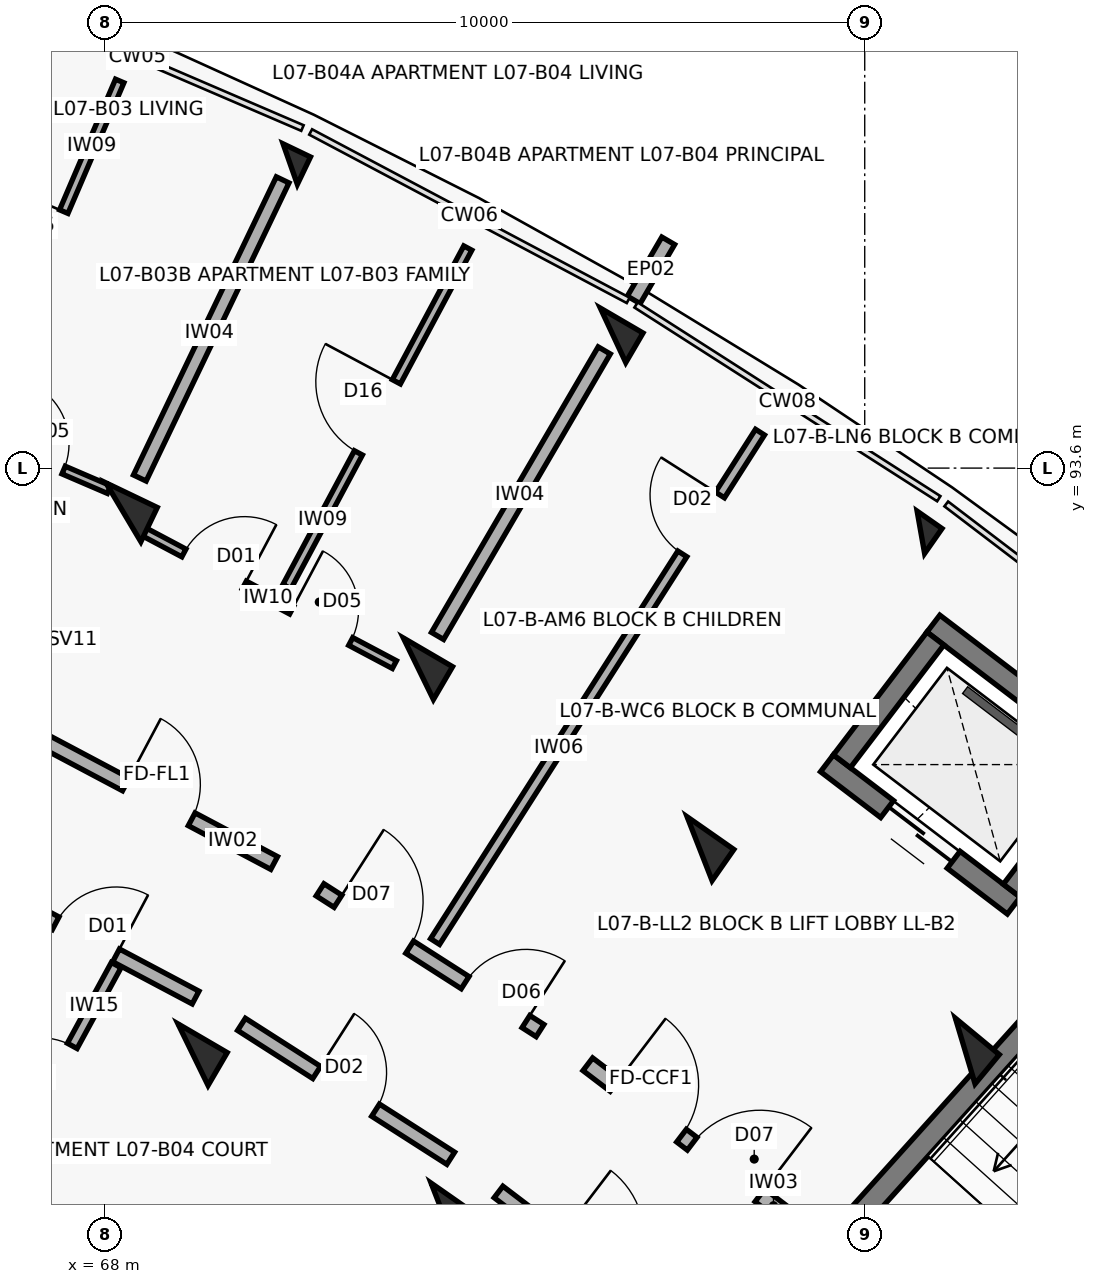
"""IFC4 building model, lengths in metres.
Left out: names, types, materials, properties, quantities, classifications, styles, units other than length and angle.
Written with IfcOpenShell. Run it as: python <this file> out.ifc"""

import sys

from ifc_helpers import new_model, si_unit, direction, frame, frame_2d, origin, origin_2d, place, context, subcontext, project, spatial, rectangle, extrude, element, fill, save


model = new_model("IFC4")
c1 = context("Model", 3, precision=1e-05, world=origin(), true_north=direction((0.0, 1.0)))
c2 = subcontext(c1, "Body", "Model", "MODEL_VIEW")
j1 = project(units=[si_unit("LENGTHUNIT", "METRE"), si_unit("PLANEANGLEUNIT", "RADIAN")], contexts=[c1])
p1 = place(None, origin())
s1 = spatial("IfcSite", under=j1, at=p1, CompositionType="ELEMENT")
p2 = place(p1, origin())
s2 = spatial("IfcBuilding", under=s1, at=p2, CompositionType="ELEMENT")
p3 = place(p2, frame((0.0, 0.0, 23.6)))
s3 = spatial("IfcBuildingStorey", under=s2, at=p3, CompositionType="ELEMENT", Elevation=23.6)
p4 = place(p3, frame((68.246, 93.019, 0.0), z_axis=(0.0, 0.0, 1.0), x_axis=(0.432085748802, 0.901832526405, 0.0)))
e1 = element("IfcColumn", 1, at=p4, inside=s3, PredefinedType="COLUMN", context=c2, shape_type="SweptSolid", body=[
    extrude(rectangle(XDim=0.5, YDim=0.75, at=origin_2d()), origin(), (0.0, 0.0, 1.0), 3.1),
])
p5 = place(p3, frame((70.441, 97.6, 0.0), z_axis=(0.0, 0.0, 1.0), x_axis=(0.432085748802, 0.901832526405, 0.0)))
e2 = element("IfcColumn", 2, at=p5, inside=s3, PredefinedType="COLUMN", context=c2, shape_type="SweptSolid", body=[
    extrude(rectangle(XDim=0.4, YDim=0.4, at=origin_2d()), origin(), (0.0, 0.0, 1.0), 3.1),
])
for number, where, z_axis, x_axis in (
    (3, (69.163, 85.882, 0.0), (0.0, 0.0, 1.0), (0.504, 0.864, 0.0)),
    (4, (72.127, 90.96, 0.0), (0.0, 0.0, 1.0), (0.504, 0.864, 0.0)),
):
    element("IfcColumn", number, at=place(p3, frame(where, z_axis=z_axis, x_axis=x_axis)), inside=s3, PredefinedType="COLUMN", context=c2, shape_type="SweptSolid", body=[
        extrude(rectangle(XDim=0.5, YDim=0.75, at=origin_2d()), origin(), (0.0, 0.0, 1.0), 3.1),
    ])
p6 = place(p3, frame((74.689, 95.347, 0.0), z_axis=(0.0, 0.0, 1.0), x_axis=(0.504226211181, 0.863571611366, 0.0)))
e5 = element("IfcColumn", 5, at=p6, inside=s3, PredefinedType="COLUMN", context=c2, shape_type="SweptSolid", body=[
    extrude(rectangle(XDim=0.45, YDim=0.65, at=origin_2d()), origin(), (0.0, 0.0, 1.0), 3.1),
])
for number, where, z_axis, x_axis in (
    (6, (72.458, 83.773, 0.0), (0.0, 0.0, 1.0), (0.573, 0.82, 0.0)),
    (7, (75.828, 88.592, 0.0), (0.0, 0.0, 1.0), (0.573, 0.82, 0.0)),
):
    element("IfcColumn", number, at=place(p3, frame(where, z_axis=z_axis, x_axis=x_axis)), inside=s3, PredefinedType="COLUMN", context=c2, shape_type="SweptSolid", body=[
        extrude(rectangle(XDim=0.5, YDim=0.75, at=origin_2d()), origin(), (0.0, 0.0, 1.0), 3.1),
    ])
p7 = place(p3, frame((78.739, 92.755, 0.0), z_axis=(0.0, 0.0, 1.0), x_axis=(0.573004420611, 0.819552276527, 0.0)))
e8 = element("IfcColumn", 8, at=p7, inside=s3, PredefinedType="COLUMN", context=c2, shape_type="SweptSolid", body=[
    extrude(rectangle(XDim=0.4, YDim=0.4, at=origin_2d()), origin(), (0.0, 0.0, 1.0), 3.1),
])
p8 = place(p3, frame((79.322, 85.93, 0.0), z_axis=(0.0, 0.0, 1.0), x_axis=(0.637961754089, 0.770068049148, 0.0)))
e9 = element("IfcColumn", 9, at=p8, inside=s3, PredefinedType="COLUMN", context=c2, shape_type="SweptSolid", body=[
    extrude(rectangle(XDim=0.5, YDim=0.75, at=origin_2d()), origin(), (0.0, 0.0, 1.0), 3.1),
])
p9 = place(p3, frame((74.961, 95.813, 0.0), z_axis=(0.0, 0.0, 1.0), x_axis=(0.504326383773, 0.863513114336, 0.0)))
e10 = element("IfcWall", 10, at=p9, inside=s3, PredefinedType="PARAPET", context=c2, shape_type="SweptSolid", body=[
    extrude(rectangle(XDim=0.9, YDim=0.195, at=frame_2d((0.45, 0.0))), origin(), (0.0, 0.0, 1.0), 2.25),
])
p10 = place(p3, frame((77.655, 83.461, 0.0), z_axis=(0.0, 0.0, 1.0), x_axis=(0.668868253964, 0.743380964808, 0.0)))
e11 = element("IfcWall", 11, at=p10, inside=s3, PredefinedType="SHEAR", context=c2, shape_type="SweptSolid", body=[
    extrude(rectangle(XDim=7.69, YDim=0.3, at=frame_2d((3.845, 0.0))), origin(), (0.0, 0.0, 1.0), 3.1),
])
p11 = place(p3, frame((79.961, 87.844, 0.0), z_axis=(0.0, 0.0, 1.0), x_axis=(-0.795464365424, 0.606000365793, 0.0)))
e12 = element("IfcWall", 12, at=p11, inside=s3, PredefinedType="SHEAR", context=c2, shape_type="SweptSolid", body=[
    extrude(rectangle(XDim=3.09, YDim=0.28, at=frame_2d((1.545, 0.0))), origin(), (0.0, 0.0, 1.0), 3.1),
])
p12 = place(p11, frame((0.995, 0.0, 0.0)))
e13 = element("IfcOpeningElement", 13, at=p12, cuts=e12, PredefinedType="OPENING", context=c2, shape_type="SweptSolid", body=[
    extrude(rectangle(XDim=1.1, YDim=2.15, at=frame_2d((0.55, 1.075))), frame((0.0, 0.15, 0.0), z_axis=(0.0, -1.0, 0.0), x_axis=(1.0, 0.0, 0.0)), (0.0, 0.0, 1.0), 0.3),
])
p13 = place(p3, frame((81.361, 89.681, 0.0), z_axis=(0.0, 0.0, 1.0), x_axis=(-0.795502452183, 0.605950368076, 0.0)))
e14 = element("IfcWall", 14, at=p13, inside=s3, PredefinedType="SHEAR", context=c2, shape_type="SweptSolid", body=[
    extrude(rectangle(XDim=3.09, YDim=0.28, at=frame_2d((1.545, 0.0))), origin(), (0.0, 0.0, 1.0), 3.1),
])
for number, where, z_axis, x_axis in (
    (15, (79.935, 88.04, 0.0), (0.0, 0.0, 1.0), (0.606, 0.795, 0.0)),
    (16, (77.699, 89.743, 0.0), (0.0, 0.0, 1.0), (0.606, 0.795, 0.0)),
):
    element("IfcWall", number, at=place(p3, frame(where, z_axis=z_axis, x_axis=x_axis)), inside=s3, PredefinedType="SHEAR", context=c2, shape_type="SweptSolid", body=[
        extrude(rectangle(XDim=2.03, YDim=0.28, at=frame_2d((1.015, 0.0))), origin(), (0.0, 0.0, 1.0), 3.1),
    ])
p14 = place(p3, frame((64.557, 94.822, 0.0), z_axis=(0.0, 0.0, 1.0), x_axis=(0.918726854017, -0.394893615684, 0.0)))
e17 = element("IfcWall", 17, at=p14, inside=s3, PredefinedType="PARTITIONING", context=c2, shape_type="SweptSolid", body=[
    extrude(rectangle(XDim=3.81, YDim=0.11, at=frame_2d((1.905, 0.0))), origin(), (0.0, 0.0, 1.0), 2.08),
])
p15 = place(p14, frame((0.65, 0.0, 0.0)))
e18 = element("IfcOpeningElement", 18, at=p15, cuts=e17, PredefinedType="OPENING", context=c2, shape_type="SweptSolid", body=[
    extrude(rectangle(XDim=0.9, YDim=2.1, at=frame_2d((0.45, 1.05))), frame((0.0, 0.065, 0.0), z_axis=(0.0, -1.0, 0.0), x_axis=(1.0, 0.0, 0.0)), (0.0, 0.0, 1.0), 0.13),
])
p16 = place(p14, frame((2.28, 0.0, 0.0)))
e19 = element("IfcOpeningElement", 19, at=p16, cuts=e17, PredefinedType="OPENING", context=c2, shape_type="SweptSolid", body=[
    extrude(rectangle(XDim=0.88, YDim=2.1, at=frame_2d((0.44, 1.05))), frame((0.0, 0.065, 0.0), z_axis=(0.0, -1.0, 0.0), x_axis=(1.0, 0.0, 0.0)), (0.0, 0.0, 1.0), 0.13),
])
p17 = place(p3, frame((66.329, 94.327, 0.0), z_axis=(0.0, 0.0, 1.0), x_axis=(0.393553279267, 0.919301809189, 0.0)))
e20 = element("IfcWall", 20, at=p17, inside=s3, PredefinedType="PARTITIONING", context=c2, shape_type="SweptSolid", body=[
    extrude(rectangle(XDim=4.75, YDim=0.12, at=frame_2d((2.375, 0.0))), origin(), (0.0, 0.0, 1.0), 2.08),
])
p18 = place(p17, frame((1.87, 0.0, 0.0)))
e21 = element("IfcOpeningElement", 21, at=p18, cuts=e20, PredefinedType="OPENING", context=c2, shape_type="SweptSolid", body=[
    extrude(rectangle(XDim=1.01, YDim=2.1, at=frame_2d((0.505, 1.05))), frame((0.0, 0.07, 0.0), z_axis=(0.0, -1.0, 0.0), x_axis=(1.0, 0.0, 0.0)), (0.0, 0.0, 1.0), 0.14),
])
p19 = place(p3, frame((67.194, 90.014, 0.0), z_axis=(0.0, 0.0, 1.0), x_axis=(0.883410853063, -0.468599258099, 0.0)))
e22 = element("IfcWall", 22, at=p19, inside=s3, PredefinedType="SOLIDWALL", context=c2, shape_type="SweptSolid", body=[
    extrude(rectangle(XDim=3.436, YDim=0.19, at=frame_2d((1.718, 0.0))), origin(), (0.0, 0.0, 1.0), 2.08),
])
p20 = place(p19, frame((1.228, 0.0, 0.0)))
e23 = element("IfcOpeningElement", 23, at=p20, cuts=e22, PredefinedType="OPENING", context=c2, shape_type="SweptSolid", body=[
    extrude(rectangle(XDim=0.98, YDim=2.15, at=frame_2d((0.49, 1.075))), frame((0.0, 0.105, 0.0), z_axis=(0.0, -1.0, 0.0), x_axis=(1.0, 0.0, 0.0)), (0.0, 0.0, 1.0), 0.21),
])
p21 = place(p3, frame((66.309, 88.165, 0.0), z_axis=(0.0, 0.0, 1.0), x_axis=(0.883444301944, -0.468536194293, 0.0)))
e24 = element("IfcWall", 24, at=p21, inside=s3, PredefinedType="SOLIDWALL", context=c2, shape_type="SweptSolid", body=[
    extrude(rectangle(XDim=3.269, YDim=0.19, at=frame_2d((1.634, 0.0))), origin(), (0.0, 0.0, 1.0), 2.08),
])
p22 = place(p21, frame((1.184, 0.0, 0.0)))
e25 = element("IfcOpeningElement", 25, at=p22, cuts=e24, PredefinedType="OPENING", context=c2, shape_type="SweptSolid", body=[
    extrude(rectangle(XDim=0.9, YDim=2.1, at=frame_2d((0.45, 1.05))), frame((0.0, 0.105, 0.0), z_axis=(0.0, -1.0, 0.0), x_axis=(1.0, 0.0, 0.0)), (0.0, 0.0, 1.0), 0.21),
])
p23 = place(p3, frame((66.575, 84.162, 0.0), z_axis=(0.0, 0.0, 1.0), x_axis=(0.477841058477, 0.878446311868, 0.0)))
e26 = element("IfcWall", 26, at=p23, inside=s3, PredefinedType="PARTITIONING", context=c2, shape_type="SweptSolid", body=[
    extrude(rectangle(XDim=3.3, YDim=0.145, at=frame_2d((1.65, 0.0))), origin(), (0.0, 0.0, 1.0), 2.08),
])
p24 = place(p23, frame((1.21, 0.0, 0.0)))
e27 = element("IfcOpeningElement", 27, at=p24, cuts=e26, PredefinedType="OPENING", context=c2, shape_type="SweptSolid", body=[
    extrude(rectangle(XDim=0.88, YDim=2.1, at=frame_2d((0.44, 1.05))), frame((0.0, 0.083, 0.0), z_axis=(0.0, -1.0, 0.0), x_axis=(1.0, 0.0, 0.0)), (0.0, 0.0, 1.0), 0.165),
])
p25 = place(p3, frame((68.468, 92.788, 0.0), z_axis=(0.0, 0.0, 1.0), x_axis=(0.883450371448, -0.468524749814, 0.0)))
e28 = element("IfcWall", 28, at=p25, inside=s3, PredefinedType="PARTITIONING", context=c2, shape_type="SweptSolid", body=[
    extrude(rectangle(XDim=3.785, YDim=0.115, at=frame_2d((1.893, 0.0))), origin(), (0.0, 0.0, 1.0), 2.08),
])
p26 = place(p25, frame((0.65, 0.0, 0.0)))
e29 = element("IfcOpeningElement", 29, at=p26, cuts=e28, PredefinedType="OPENING", context=c2, shape_type="SweptSolid", body=[
    extrude(rectangle(XDim=0.9, YDim=2.1, at=frame_2d((0.45, 1.05))), frame((0.0, 0.067, 0.0), z_axis=(0.0, -1.0, 0.0), x_axis=(1.0, 0.0, 0.0)), (0.0, 0.0, 1.0), 0.135),
])
p27 = place(p25, frame((2.255, 0.0, 0.0)))
e30 = element("IfcOpeningElement", 30, at=p27, cuts=e28, PredefinedType="OPENING", context=c2, shape_type="SweptSolid", body=[
    extrude(rectangle(XDim=0.88, YDim=2.1, at=frame_2d((0.44, 1.05))), frame((0.0, 0.067, 0.0), z_axis=(0.0, -1.0, 0.0), x_axis=(1.0, 0.0, 0.0)), (0.0, 0.0, 1.0), 0.135),
])
p28 = place(p3, frame((70.398, 92.041, 0.0), z_axis=(0.0, 0.0, 1.0), x_axis=(0.471222960991, 0.882014127457, 0.0)))
e31 = element("IfcWall", 31, at=p28, inside=s3, PredefinedType="PARTITIONING", context=c2, shape_type="SweptSolid", body=[
    extrude(rectangle(XDim=5.05, YDim=0.12, at=frame_2d((2.525, 0.0))), origin(), (0.0, 0.0, 1.0), 2.08),
])
p29 = place(p28, frame((1.995, 0.0, 0.0)))
e32 = element("IfcOpeningElement", 32, at=p29, cuts=e31, PredefinedType="OPENING", context=c2, shape_type="SweptSolid", body=[
    extrude(rectangle(XDim=1.06, YDim=2.1, at=frame_2d((0.53, 1.05))), frame((0.0, 0.07, 0.0), z_axis=(0.0, -1.0, 0.0), x_axis=(1.0, 0.0, 0.0)), (0.0, 0.0, 1.0), 0.14),
])
p30 = place(p3, frame((68.462, 93.469, 0.0), z_axis=(0.0, 0.0, 1.0), x_axis=(0.432086898897, 0.901831975371, 0.0)))
e33 = element("IfcWall", 33, at=p30, inside=s3, PredefinedType="SOLIDWALL", context=c2, shape_type="SweptSolid", body=[
    extrude(rectangle(XDim=4.35, YDim=0.185, at=frame_2d((2.175, 0.0))), origin(), (0.0, 0.0, 1.0), 2.08),
])
p31 = place(p3, frame((70.834, 88.051, 0.0), z_axis=(0.0, 0.0, 1.0), x_axis=(0.842257205985, -0.539075874963, 0.0)))
e34 = element("IfcWall", 34, at=p31, inside=s3, PredefinedType="SOLIDWALL", context=c2, shape_type="SweptSolid", body=[
    extrude(rectangle(XDim=3.436, YDim=0.19, at=frame_2d((1.718, 0.0))), origin(), (0.0, 0.0, 1.0), 2.08),
])
p32 = place(p31, frame((0.28, 0.0, 0.0)))
e35 = element("IfcOpeningElement", 35, at=p32, cuts=e34, PredefinedType="OPENING", context=c2, shape_type="SweptSolid", body=[
    extrude(rectangle(XDim=1.12, YDim=2.15, at=frame_2d((0.56, 1.075))), frame((0.0, 0.105, 0.0), z_axis=(0.0, -1.0, 0.0), x_axis=(1.0, 0.0, 0.0)), (0.0, 0.0, 1.0), 0.21),
])
p33 = place(p31, frame((2.266, 0.0, 0.0)))
e36 = element("IfcOpeningElement", 36, at=p33, cuts=e34, PredefinedType="OPENING", context=c2, shape_type="SweptSolid", body=[
    extrude(rectangle(XDim=0.95, YDim=2.1, at=frame_2d((0.475, 1.05))), frame((0.0, 0.105, 0.0), z_axis=(0.0, -1.0, 0.0), x_axis=(1.0, 0.0, 0.0)), (0.0, 0.0, 1.0), 0.21),
])
p34 = place(p3, frame((69.8, 86.281, 0.0), z_axis=(0.0, 0.0, 1.0), x_axis=(0.842225276846, -0.539125758095, 0.0)))
e37 = element("IfcWall", 37, at=p34, inside=s3, PredefinedType="SOLIDWALL", context=c2, shape_type="SweptSolid", body=[
    extrude(rectangle(XDim=3.269, YDim=0.19, at=frame_2d((1.634, 0.0))), origin(), (0.0, 0.0, 1.0), 2.08),
])
p35 = place(p34, frame((1.174, 0.0, 0.0)))
e38 = element("IfcOpeningElement", 38, at=p35, cuts=e37, PredefinedType="OPENING", context=c2, shape_type="SweptSolid", body=[
    extrude(rectangle(XDim=0.92, YDim=2.1, at=frame_2d((0.46, 1.05))), frame((0.0, 0.105, 0.0), z_axis=(0.0, -1.0, 0.0), x_axis=(1.0, 0.0, 0.0)), (0.0, 0.0, 1.0), 0.21),
])
p36 = place(p3, frame((72.347, 87.37, 0.0), z_axis=(0.0, 0.0, 1.0), x_axis=(0.537777309481, 0.843086926365, 0.0)))
e39 = element("IfcWall", 39, at=p36, inside=s3, PredefinedType="PARTITIONING", context=c2, shape_type="SweptSolid", body=[
    extrude(rectangle(XDim=7.95, YDim=0.14, at=frame_2d((3.975, 0.0))), origin(), (0.0, 0.0, 1.0), 2.08),
])
p37 = place(p36, frame((6.05, 0.0, 0.0)))
e40 = element("IfcOpeningElement", 40, at=p37, cuts=e39, PredefinedType="OPENING", context=c2, shape_type="SweptSolid", body=[
    extrude(rectangle(XDim=0.92, YDim=2.1, at=frame_2d((0.46, 1.05))), frame((0.0, 0.08, 0.0), z_axis=(0.0, -1.0, 0.0), x_axis=(1.0, 0.0, 0.0)), (0.0, 0.0, 1.0), 0.16),
])
p38 = place(p3, frame((72.379, 91.392, 0.0), z_axis=(0.0, 0.0, 1.0), x_axis=(0.504216452091, 0.863577309475, 0.0)))
e41 = element("IfcWall", 41, at=p38, inside=s3, PredefinedType="SOLIDWALL", context=c2, shape_type="SweptSolid", body=[
    extrude(rectangle(XDim=4.35, YDim=0.185, at=frame_2d((2.175, 0.0))), origin(), (0.0, 0.0, 1.0), 2.08),
])
p39 = place(p3, frame((74.357, 85.756, 0.0), z_axis=(0.0, 0.0, 1.0), x_axis=(0.795498026433, -0.605956178235, 0.0)))
e42 = element("IfcWall", 42, at=p39, inside=s3, PredefinedType="SOLIDWALL", context=c2, shape_type="SweptSolid", body=[
    extrude(rectangle(XDim=3.296, YDim=0.21, at=frame_2d((1.648, 0.0))), origin(), (0.0, 0.0, 1.0), 2.08),
])
p40 = place(p39, frame((0.45, 0.0, 0.0)))
e43 = element("IfcOpeningElement", 43, at=p40, cuts=e42, PredefinedType="OPENING", context=c2, shape_type="SweptSolid", body=[
    extrude(rectangle(XDim=1.1, YDim=2.15, at=frame_2d((0.55, 1.075))), frame((0.0, 0.115, 0.0), z_axis=(0.0, -1.0, 0.0), x_axis=(1.0, 0.0, 0.0)), (0.0, 0.0, 1.0), 0.23),
])
p41 = place(p39, frame((1.726, 0.0, 0.0)))
e44 = element("IfcOpeningElement", 44, at=p41, cuts=e42, PredefinedType="OPENING", context=c2, shape_type="SweptSolid", body=[
    extrude(rectangle(XDim=1.12, YDim=2.15, at=frame_2d((0.56, 1.075))), frame((0.0, 0.115, 0.0), z_axis=(0.0, -1.0, 0.0), x_axis=(1.0, 0.0, 0.0)), (0.0, 0.0, 1.0), 0.23),
])
p42 = place(p3, frame((73.182, 84.076, 0.0), z_axis=(0.0, 0.0, 1.0), x_axis=(0.795501577908, -0.605951515838, 0.0)))
e45 = element("IfcWall", 45, at=p42, inside=s3, PredefinedType="SOLIDWALL", context=c2, shape_type="SweptSolid", body=[
    extrude(rectangle(XDim=3.129, YDim=0.19, at=frame_2d((1.564, 0.0))), origin(), (0.0, 0.0, 1.0), 2.08),
])
p43 = place(p42, frame((1.004, 0.0, 0.0)))
e46 = element("IfcOpeningElement", 46, at=p43, cuts=e45, PredefinedType="OPENING", context=c2, shape_type="SweptSolid", body=[
    extrude(rectangle(XDim=1.12, YDim=2.15, at=frame_2d((0.56, 1.075))), frame((0.0, 0.105, 0.0), z_axis=(0.0, -1.0, 0.0), x_axis=(1.0, 0.0, 0.0)), (0.0, 0.0, 1.0), 0.21),
])
p44 = place(p12, origin())
e47 = element("IfcDoor", 47, at=p44, inside=s3, OperationType="DOUBLE_DOOR_SLIDING", PredefinedType="DOOR", context=c2, shape_type="SweptSolid", body=[
    extrude(rectangle(XDim=1.1, YDim=2.15, at=frame_2d((0.55, 1.075))), frame((0.0, 0.025, 0.0), z_axis=(0.0, -1.0, 0.0), x_axis=(1.0, 0.0, 0.0)), (0.0, 0.0, 1.0), 0.05),
])
fill(e13, e47)
p45 = place(p16, origin())
e48 = element("IfcDoor", 48, at=p45, inside=s3, OperationType="SINGLE_SWING_LEFT", PredefinedType="DOOR", context=c2, shape_type="SweptSolid", body=[
    extrude(rectangle(XDim=0.88, YDim=2.1, at=frame_2d((0.44, 1.05))), frame((0.0, 0.025, 0.0), z_axis=(0.0, -1.0, 0.0), x_axis=(1.0, 0.0, 0.0)), (0.0, 0.0, 1.0), 0.05),
])
fill(e19, e48)
p46 = place(p18, origin())
e49 = element("IfcDoor", 49, at=p46, inside=s3, OperationType="SINGLE_SWING_RIGHT", PredefinedType="DOOR", context=c2, shape_type="SweptSolid", body=[
    extrude(rectangle(XDim=1.01, YDim=2.1, at=frame_2d((0.505, 1.05))), frame((0.0, 0.025, 0.0), z_axis=(0.0, -1.0, 0.0), x_axis=(1.0, 0.0, 0.0)), (0.0, 0.0, 1.0), 0.05),
])
fill(e21, e49)
p47 = place(p20, origin())
e50 = element("IfcDoor", 50, at=p47, inside=s3, OperationType="SINGLE_SWING_LEFT", PredefinedType="DOOR", context=c2, shape_type="SweptSolid", body=[
    extrude(rectangle(XDim=0.98, YDim=2.15, at=frame_2d((0.49, 1.075))), frame((0.0, 0.025, 0.0), z_axis=(0.0, -1.0, 0.0), x_axis=(1.0, 0.0, 0.0)), (0.0, 0.0, 1.0), 0.05),
])
fill(e23, e50)
p48 = place(p22, origin())
e51 = element("IfcDoor", 51, at=p48, inside=s3, OperationType="SINGLE_SWING_RIGHT", PredefinedType="DOOR", context=c2, shape_type="SweptSolid", body=[
    extrude(rectangle(XDim=0.9, YDim=2.1, at=frame_2d((0.45, 1.05))), frame((0.0, 0.025, 0.0), z_axis=(0.0, -1.0, 0.0), x_axis=(1.0, 0.0, 0.0)), (0.0, 0.0, 1.0), 0.05),
])
fill(e25, e51)
p49 = place(p24, origin())
e52 = element("IfcDoor", 52, at=p49, inside=s3, OperationType="SINGLE_SWING_LEFT", PredefinedType="DOOR", context=c2, shape_type="SweptSolid", body=[
    extrude(rectangle(XDim=0.88, YDim=2.1, at=frame_2d((0.44, 1.05))), frame((0.0, 0.025, 0.0), z_axis=(0.0, -1.0, 0.0), x_axis=(1.0, 0.0, 0.0)), (0.0, 0.0, 1.0), 0.05),
])
fill(e27, e52)
p50 = place(p26, origin())
e53 = element("IfcDoor", 53, at=p50, inside=s3, OperationType="SINGLE_SWING_RIGHT", PredefinedType="DOOR", context=c2, shape_type="SweptSolid", body=[
    extrude(rectangle(XDim=0.9, YDim=2.1, at=frame_2d((0.45, 1.05))), frame((0.0, 0.025, 0.0), z_axis=(0.0, -1.0, 0.0), x_axis=(1.0, 0.0, 0.0)), (0.0, 0.0, 1.0), 0.05),
])
fill(e29, e53)
p51 = place(p27, origin())
e54 = element("IfcDoor", 54, at=p51, inside=s3, OperationType="SINGLE_SWING_LEFT", PredefinedType="DOOR", context=c2, shape_type="SweptSolid", body=[
    extrude(rectangle(XDim=0.88, YDim=2.1, at=frame_2d((0.44, 1.05))), frame((0.0, 0.025, 0.0), z_axis=(0.0, -1.0, 0.0), x_axis=(1.0, 0.0, 0.0)), (0.0, 0.0, 1.0), 0.05),
])
fill(e30, e54)
p52 = place(p29, origin())
e55 = element("IfcDoor", 55, at=p52, inside=s3, OperationType="SINGLE_SWING_RIGHT", PredefinedType="DOOR", context=c2, shape_type="SweptSolid", body=[
    extrude(rectangle(XDim=1.06, YDim=2.1, at=frame_2d((0.53, 1.05))), frame((0.0, 0.025, 0.0), z_axis=(0.0, -1.0, 0.0), x_axis=(1.0, 0.0, 0.0)), (0.0, 0.0, 1.0), 0.05),
])
fill(e32, e55)
p53 = place(p32, origin())
e56 = element("IfcDoor", 56, at=p53, inside=s3, OperationType="SINGLE_SWING_LEFT", PredefinedType="DOOR", context=c2, shape_type="SweptSolid", body=[
    extrude(rectangle(XDim=1.12, YDim=2.15, at=frame_2d((0.56, 1.075))), frame((0.0, 0.025, 0.0), z_axis=(0.0, -1.0, 0.0), x_axis=(1.0, 0.0, 0.0)), (0.0, 0.0, 1.0), 0.05),
])
fill(e35, e56)
p54 = place(p33, origin())
e57 = element("IfcDoor", 57, at=p54, inside=s3, OperationType="SINGLE_SWING_RIGHT", PredefinedType="DOOR", context=c2, shape_type="SweptSolid", body=[
    extrude(rectangle(XDim=0.95, YDim=2.1, at=frame_2d((0.475, 1.05))), frame((0.0, 0.025, 0.0), z_axis=(0.0, -1.0, 0.0), x_axis=(1.0, 0.0, 0.0)), (0.0, 0.0, 1.0), 0.05),
])
fill(e36, e57)
p55 = place(p35, origin())
e58 = element("IfcDoor", 58, at=p55, inside=s3, OperationType="SINGLE_SWING_LEFT", PredefinedType="DOOR", context=c2, shape_type="SweptSolid", body=[
    extrude(rectangle(XDim=0.92, YDim=2.1, at=frame_2d((0.46, 1.05))), frame((0.0, 0.025, 0.0), z_axis=(0.0, -1.0, 0.0), x_axis=(1.0, 0.0, 0.0)), (0.0, 0.0, 1.0), 0.05),
])
fill(e38, e58)
p56 = place(p37, origin())
e59 = element("IfcDoor", 59, at=p56, inside=s3, OperationType="SINGLE_SWING_RIGHT", PredefinedType="DOOR", context=c2, shape_type="SweptSolid", body=[
    extrude(rectangle(XDim=0.92, YDim=2.1, at=frame_2d((0.46, 1.05))), frame((0.0, 0.025, 0.0), z_axis=(0.0, -1.0, 0.0), x_axis=(1.0, 0.0, 0.0)), (0.0, 0.0, 1.0), 0.05),
])
fill(e40, e59)
p57 = place(p40, origin())
e60 = element("IfcDoor", 60, at=p57, inside=s3, OperationType="SINGLE_SWING_LEFT", PredefinedType="DOOR", context=c2, shape_type="SweptSolid", body=[
    extrude(rectangle(XDim=1.1, YDim=2.15, at=frame_2d((0.55, 1.075))), frame((0.0, 0.025, 0.0), z_axis=(0.0, -1.0, 0.0), x_axis=(1.0, 0.0, 0.0)), (0.0, 0.0, 1.0), 0.05),
])
fill(e43, e60)
p58 = place(p41, origin())
e61 = element("IfcDoor", 61, at=p58, inside=s3, OperationType="SINGLE_SWING_RIGHT", PredefinedType="DOOR", context=c2, shape_type="SweptSolid", body=[
    extrude(rectangle(XDim=1.12, YDim=2.15, at=frame_2d((0.56, 1.075))), frame((0.0, 0.025, 0.0), z_axis=(0.0, -1.0, 0.0), x_axis=(1.0, 0.0, 0.0)), (0.0, 0.0, 1.0), 0.05),
])
fill(e44, e61)
save(model, sys.argv[1])
